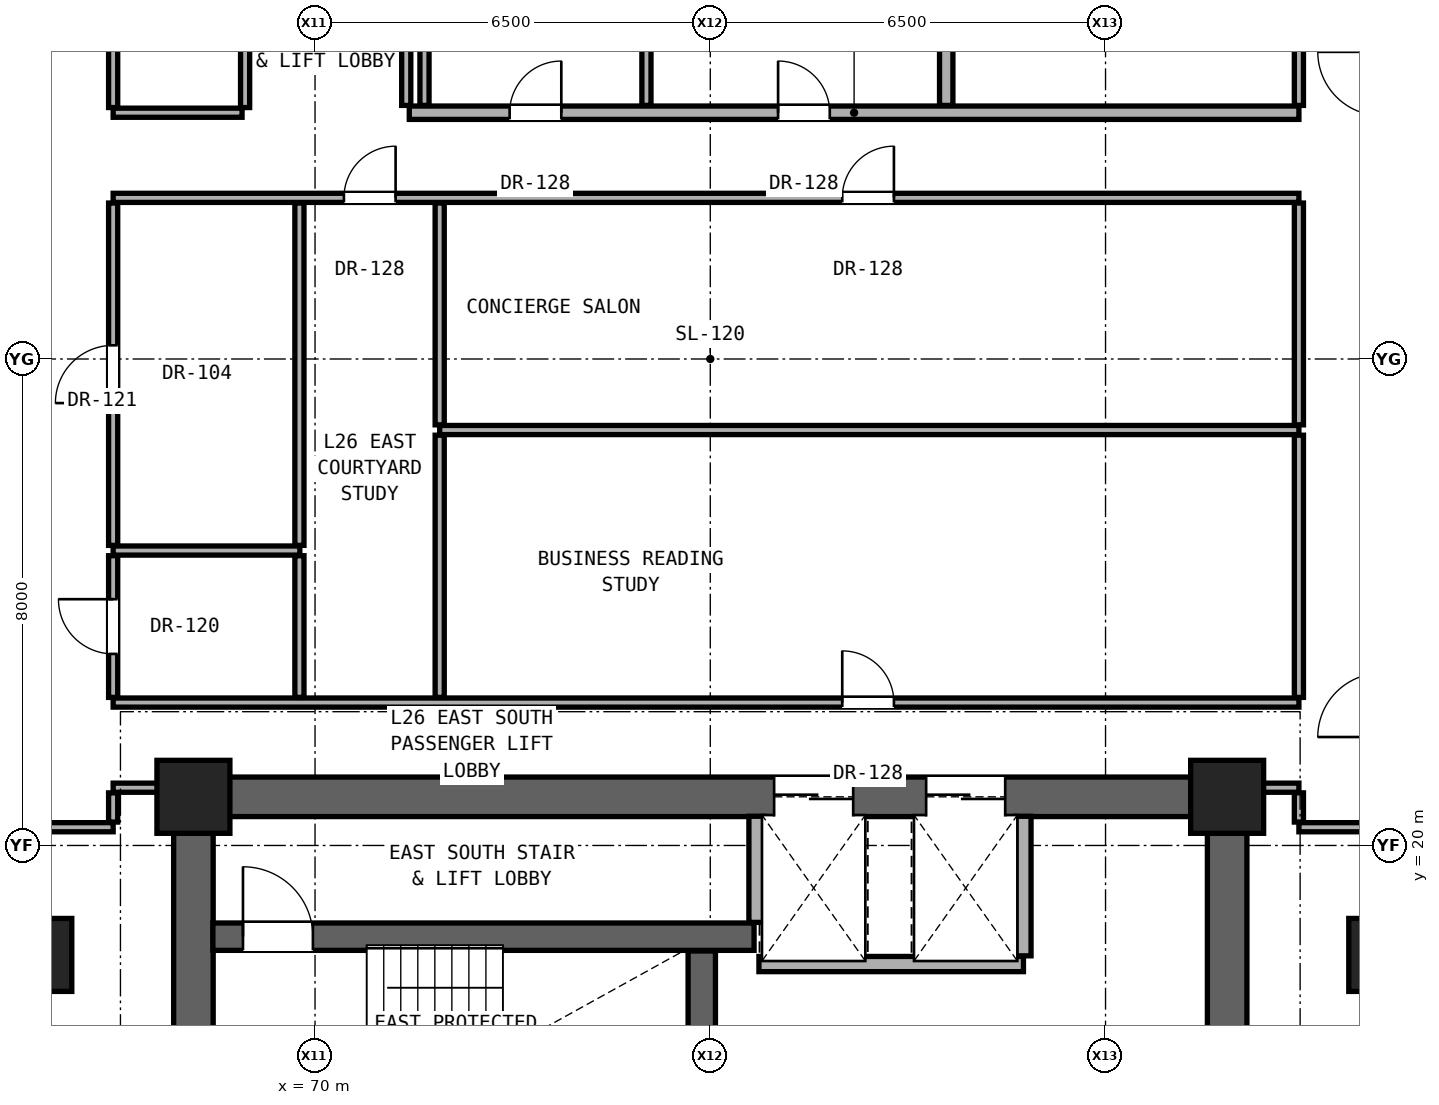
"""IFC4 building model, lengths in metres.
Left out: names, types, materials, properties, quantities, classifications, styles, units other than length and angle.
Written with IfcOpenShell. Run it as: python <this file> out.ifc"""

import sys

from ifc_helpers import new_model, si_unit, direction, frame, frame_2d, origin, origin_2d, place, context, subcontext, project, spatial, rectangle, extrude, element, fill, save


model = new_model("IFC4")
c1 = context("Model", 3, precision=1e-05, world=origin(), true_north=direction((0.0, 1.0)))
c2 = subcontext(c1, "Body", "Model", "MODEL_VIEW")
j1 = project(units=[si_unit("LENGTHUNIT", "METRE"), si_unit("PLANEANGLEUNIT", "RADIAN")], contexts=[c1])
p1 = place(None, origin())
s1 = spatial("IfcSite", under=j1, at=p1, CompositionType="ELEMENT")
p2 = place(p1, origin())
s2 = spatial("IfcBuilding", under=s1, at=p2, CompositionType="ELEMENT")
p3 = place(p2, frame((0.0, 0.0, 95.0)))
s3 = spatial("IfcBuildingStorey", under=s2, at=p3, CompositionType="ELEMENT", Elevation=95.0)
for number, where, z_axis, x_axis in (
    (1, (68.0, 20.8, 0.0), (0.0, 0.0, 1.0), (1.0, 0.0, 0.0)),
    (2, (85.0, 20.8, 0.0), (0.0, 0.0, 1.0), (1.0, 0.0, 0.0)),
):
    element("IfcColumn", number, at=place(p3, frame(where, z_axis=z_axis, x_axis=x_axis)), inside=s3, PredefinedType="COLUMN", context=c2, shape_type="SweptSolid", body=[
        extrude(rectangle(XDim=1.2, YDim=1.2, at=origin_2d()), origin(), (0.0, 0.0, 1.0), 3.3),
    ])
for number, where, z_axis, x_axis in (
    (3, (65.6, 18.2, 0.0), (0.0, 0.0, 1.0), (1.0, 0.0, 0.0)),
    (4, (87.4, 18.2, 0.0), (0.0, 0.0, 1.0), (1.0, 0.0, 0.0)),
):
    element("IfcColumn", number, at=place(p3, frame(where, z_axis=z_axis, x_axis=x_axis)), inside=s3, PredefinedType="PILASTER", context=c2, shape_type="SweptSolid", body=[
        extrude(rectangle(XDim=0.8, YDim=1.2, at=origin_2d()), origin(), (0.0, 0.0, 1.0), 3.3),
    ])
for number, where, z_axis, x_axis in (
    (5, (68.0, 15.2, 0.0), (0.0, 0.0, 1.0), (0.0, 1.0, 0.0)),
    (6, (85.0, 15.2, 0.0), (0.0, 0.0, 1.0), (0.0, 1.0, 0.0)),
):
    element("IfcWall", number, at=place(p3, frame(where, z_axis=z_axis, x_axis=x_axis)), inside=s3, PredefinedType="SHEAR", context=c2, shape_type="SweptSolid", body=[
        extrude(rectangle(XDim=5.6, YDim=0.65, at=frame_2d((2.8, 0.0))), origin(), (0.0, 0.0, 1.0), 3.08),
    ])
p4 = place(p3, frame((68.0, 20.8, 0.0), z_axis=(0.0, 0.0, 1.0), x_axis=(1.0, 0.0, 0.0)))
e7 = element("IfcWall", 7, at=p4, inside=s3, PredefinedType="SHEAR", context=c2, shape_type="SweptSolid", body=[
    extrude(rectangle(XDim=17.0, YDim=0.65, at=frame_2d((8.5, 0.0))), origin(), (0.0, 0.0, 1.0), 3.08),
])
p5 = place(p4, frame((9.55, 0.0, 0.0)))
e8 = element("IfcOpeningElement", 8, at=p5, cuts=e7, PredefinedType="OPENING", context=c2, shape_type="SweptSolid", body=[
    extrude(rectangle(XDim=1.3, YDim=2.3, at=frame_2d((0.65, 1.15))), frame((0.0, 0.335, 0.0), z_axis=(0.0, -1.0, 0.0), x_axis=(1.0, 0.0, 0.0)), (0.0, 0.0, 1.0), 0.67),
])
p6 = place(p4, frame((12.05, 0.0, 0.0)))
e9 = element("IfcOpeningElement", 9, at=p6, cuts=e7, PredefinedType="OPENING", context=c2, shape_type="SweptSolid", body=[
    extrude(rectangle(XDim=1.3, YDim=2.3, at=frame_2d((0.65, 1.15))), frame((0.0, 0.335, 0.0), z_axis=(0.0, -1.0, 0.0), x_axis=(1.0, 0.0, 0.0)), (0.0, 0.0, 1.0), 0.67),
])
p7 = place(p3, frame((77.3, 18.05, 0.0), z_axis=(0.0, 0.0, 1.0), x_axis=(1.0, 0.0, 0.0)))
e10 = element("IfcWall", 10, at=p7, inside=s3, PredefinedType="SOLIDWALL", context=c2, shape_type="SweptSolid", body=[
    extrude(rectangle(XDim=4.35, YDim=0.25, at=frame_2d((2.175, 0.0))), origin(), (0.0, 0.0, 1.0), 3.08),
])
p8 = place(p3, frame((68.32, 18.5, 0.0), z_axis=(0.0, 0.0, 1.0), x_axis=(1.0, 0.0, 0.0)))
e11 = element("IfcWall", 11, at=p8, inside=s3, PredefinedType="SHEAR", context=c2, shape_type="SweptSolid", body=[
    extrude(rectangle(XDim=8.9, YDim=0.45, at=frame_2d((4.45, 0.0))), origin(), (0.0, 0.0, 1.0), 3.08),
])
p9 = place(p8, frame((0.495, 0.0, 0.0)))
e12 = element("IfcOpeningElement", 12, at=p9, cuts=e11, PredefinedType="OPENING", context=c2, shape_type="SweptSolid", body=[
    extrude(rectangle(XDim=1.15, YDim=2.2, at=frame_2d((0.575, 1.1))), frame((0.0, 0.235, 0.0), z_axis=(0.0, -1.0, 0.0), x_axis=(1.0, 0.0, 0.0)), (0.0, 0.0, 1.0), 0.47),
])
p10 = place(p3, frame((65.32, 20.3, 0.0), z_axis=(0.0, 0.0, 1.0), x_axis=(1.0, 0.0, 0.0)))
e13 = element("IfcWall", 13, at=p10, inside=s3, PredefinedType="PARTITIONING", context=c2, shape_type="SweptSolid", body=[
    extrude(rectangle(XDim=1.36, YDim=0.15, at=frame_2d((0.68, 0.0))), origin(), (0.0, 0.0, 1.0), 3.08),
])
p11 = place(p3, frame((86.18, 20.3, 0.0), z_axis=(0.0, 0.0, 1.0), x_axis=(1.0, 0.0, 0.0)))
e14 = element("IfcWall", 14, at=p11, inside=s3, PredefinedType="PARTITIONING", context=c2, shape_type="SweptSolid", body=[
    extrude(rectangle(XDim=1.36, YDim=0.15, at=frame_2d((0.68, 0.0))), origin(), (0.0, 0.0, 1.0), 3.08),
])
p12 = place(p3, frame((66.68, 20.95, 0.0), z_axis=(0.0, 0.0, 1.0), x_axis=(1.0, 0.0, 0.0)))
e15 = element("IfcWall", 15, at=p12, inside=s3, PredefinedType="PARTITIONING", context=c2, shape_type="SweptSolid", body=[
    extrude(rectangle(XDim=1.0, YDim=0.15, at=frame_2d((0.5, 0.0))), origin(), (0.0, 0.0, 1.0), 2.472),
])
p13 = place(p3, frame((85.32, 20.95, 0.0), z_axis=(0.0, 0.0, 1.0), x_axis=(1.0, 0.0, 0.0)))
e16 = element("IfcWall", 16, at=p13, inside=s3, PredefinedType="PARTITIONING", context=c2, shape_type="SweptSolid", body=[
    extrude(rectangle(XDim=0.86, YDim=0.15, at=frame_2d((0.43, 0.0))), origin(), (0.0, 0.0, 1.0), 2.472),
])
p14 = place(p3, frame((66.68, 22.35, 0.0), z_axis=(0.0, 0.0, 1.0), x_axis=(1.0, 0.0, 0.0)))
e17 = element("IfcWall", 17, at=p14, inside=s3, PredefinedType="PARTITIONING", context=c2, shape_type="SweptSolid", body=[
    extrude(rectangle(XDim=19.5, YDim=0.15, at=frame_2d((9.75, 0.0))), origin(), (0.0, 0.0, 1.0), 2.145),
])
p15 = place(p14, frame((11.99, 0.0, 0.0)))
e18 = element("IfcOpeningElement", 18, at=p15, cuts=e17, PredefinedType="OPENING", context=c2, shape_type="SweptSolid", body=[
    extrude(rectangle(XDim=0.85, YDim=2.01, at=frame_2d((0.425, 1.005))), frame((0.0, 0.085, 0.0), z_axis=(0.0, -1.0, 0.0), x_axis=(1.0, 0.0, 0.0)), (0.0, 0.0, 1.0), 0.17),
])
p16 = place(p3, frame((66.68, 24.85, 0.0), z_axis=(0.0, 0.0, 1.0), x_axis=(1.0, 0.0, 0.0)))
e19 = element("IfcWall", 19, at=p16, inside=s3, PredefinedType="PARTITIONING", context=c2, shape_type="SweptSolid", body=[
    extrude(rectangle(XDim=3.07, YDim=0.15, at=frame_2d((1.535, 0.0))), origin(), (0.0, 0.0, 1.0), 2.145),
])
p17 = place(p3, frame((72.05, 26.832, 0.0), z_axis=(0.0, 0.0, 1.0), x_axis=(1.0, 0.0, 0.0)))
e20 = element("IfcWall", 20, at=p17, inside=s3, PredefinedType="PARTITIONING", context=c2, shape_type="SweptSolid", body=[
    extrude(rectangle(XDim=14.13, YDim=0.15, at=frame_2d((7.065, 0.0))), origin(), (0.0, 0.0, 1.0), 2.145),
])
p18 = place(p3, frame((66.68, 30.65, 0.0), z_axis=(0.0, 0.0, 1.0), x_axis=(1.0, 0.0, 0.0)))
e21 = element("IfcWall", 21, at=p18, inside=s3, PredefinedType="PARTITIONING", context=c2, shape_type="SweptSolid", body=[
    extrude(rectangle(XDim=19.5, YDim=0.15, at=frame_2d((9.75, 0.0))), origin(), (0.0, 0.0, 1.0), 2.145),
])
p19 = place(p18, frame((3.795, 0.0, 0.0)))
e22 = element("IfcOpeningElement", 22, at=p19, cuts=e21, PredefinedType="OPENING", context=c2, shape_type="SweptSolid", body=[
    extrude(rectangle(XDim=0.85, YDim=2.01, at=frame_2d((0.425, 1.005))), frame((0.0, 0.085, 0.0), z_axis=(0.0, -1.0, 0.0), x_axis=(1.0, 0.0, 0.0)), (0.0, 0.0, 1.0), 0.17),
])
p20 = place(p18, frame((11.99, 0.0, 0.0)))
e23 = element("IfcOpeningElement", 23, at=p20, cuts=e21, PredefinedType="OPENING", context=c2, shape_type="SweptSolid", body=[
    extrude(rectangle(XDim=0.85, YDim=2.01, at=frame_2d((0.425, 1.005))), frame((0.0, 0.085, 0.0), z_axis=(0.0, -1.0, 0.0), x_axis=(1.0, 0.0, 0.0)), (0.0, 0.0, 1.0), 0.17),
])
p21 = place(p3, frame((66.68, 32.05, 0.0), z_axis=(0.0, 0.0, 1.0), x_axis=(1.0, 0.0, 0.0)))
e24 = element("IfcWall", 24, at=p21, inside=s3, PredefinedType="PARTITIONING", context=c2, shape_type="SweptSolid", body=[
    extrude(rectangle(XDim=2.12, YDim=0.15, at=frame_2d((1.06, 0.0))), origin(), (0.0, 0.0, 1.0), 2.145),
])
p22 = place(p3, frame((71.55, 32.05, 0.0), z_axis=(0.0, 0.0, 1.0), x_axis=(1.0, 0.0, 0.0)))
e25 = element("IfcWall", 25, at=p22, inside=s3, PredefinedType="SOLIDWALL", context=c2, shape_type="SweptSolid", body=[
    extrude(rectangle(XDim=14.63, YDim=0.22, at=frame_2d((7.315, 0.0))), origin(), (0.0, 0.0, 1.0), 2.145),
])
p23 = place(p22, frame((6.065, 0.0, 0.0)))
e26 = element("IfcOpeningElement", 26, at=p23, cuts=e25, PredefinedType="OPENING", context=c2, shape_type="SweptSolid", body=[
    extrude(rectangle(XDim=0.85, YDim=2.01, at=frame_2d((0.425, 1.005))), frame((0.0, 0.12, 0.0), z_axis=(0.0, -1.0, 0.0), x_axis=(1.0, 0.0, 0.0)), (0.0, 0.0, 1.0), 0.24),
])
p24 = place(p22, frame((1.65, 0.0, 0.0)))
e27 = element("IfcOpeningElement", 27, at=p24, cuts=e25, PredefinedType="OPENING", context=c2, shape_type="SweptSolid", body=[
    extrude(rectangle(XDim=0.85, YDim=2.01, at=frame_2d((0.425, 1.005))), frame((0.0, 0.12, 0.0), z_axis=(0.0, -1.0, 0.0), x_axis=(1.0, 0.0, 0.0)), (0.0, 0.0, 1.0), 0.24),
])
p25 = place(p3, frame((66.68, 20.385, 0.0), z_axis=(0.0, 0.0, 1.0), x_axis=(0.0, 1.0, 0.0)))
e28 = element("IfcWall", 28, at=p25, inside=s3, PredefinedType="PARTITIONING", context=c2, shape_type="SweptSolid", body=[
    extrude(rectangle(XDim=0.48, YDim=0.15, at=frame_2d((0.24, 0.0))), origin(), (0.0, 0.0, 1.0), 2.472),
])
p26 = place(p3, frame((66.68, 22.435, 0.0), z_axis=(0.0, 0.0, 1.0), x_axis=(0.0, 1.0, 0.0)))
e29 = element("IfcWall", 29, at=p26, inside=s3, PredefinedType="PARTITIONING", context=c2, shape_type="SweptSolid", body=[
    extrude(rectangle(XDim=2.33, YDim=0.15, at=frame_2d((1.165, 0.0))), origin(), (0.0, 0.0, 1.0), 3.08),
])
p27 = place(p26, frame((0.715, 0.0, 0.0)))
e30 = element("IfcOpeningElement", 30, at=p27, cuts=e29, PredefinedType="OPENING", context=c2, shape_type="SweptSolid", body=[
    extrude(rectangle(XDim=0.9, YDim=2.1, at=frame_2d((0.45, 1.05))), frame((0.0, 0.085, 0.0), z_axis=(0.0, -1.0, 0.0), x_axis=(1.0, 0.0, 0.0)), (0.0, 0.0, 1.0), 0.17),
])
p28 = place(p3, frame((66.68, 24.935, 0.0), z_axis=(0.0, 0.0, 1.0), x_axis=(0.0, 1.0, 0.0)))
e31 = element("IfcWall", 31, at=p28, inside=s3, PredefinedType="PARTITIONING", context=c2, shape_type="SweptSolid", body=[
    extrude(rectangle(XDim=5.63, YDim=0.15, at=frame_2d((2.815, 0.0))), origin(), (0.0, 0.0, 1.0), 2.299),
])
p29 = place(p28, frame((2.34, 0.0, 0.0)))
e32 = element("IfcOpeningElement", 32, at=p29, cuts=e31, PredefinedType="OPENING", context=c2, shape_type="SweptSolid", body=[
    extrude(rectangle(XDim=0.95, YDim=2.15, at=frame_2d((0.475, 1.075))), frame((0.0, 0.085, 0.0), z_axis=(0.0, -1.0, 0.0), x_axis=(1.0, 0.0, 0.0)), (0.0, 0.0, 1.0), 0.17),
])
p30 = place(p3, frame((66.68, 32.135, 0.0), z_axis=(0.0, 0.0, 1.0), x_axis=(0.0, 1.0, 0.0)))
e33 = element("IfcWall", 33, at=p30, inside=s3, PredefinedType="PARTITIONING", context=c2, shape_type="SweptSolid", body=[
    extrude(rectangle(XDim=3.48, YDim=0.15, at=frame_2d((1.74, 0.0))), origin(), (0.0, 0.0, 1.0), 2.472),
])
p31 = place(p3, frame((68.85, 32.135, 0.0), z_axis=(0.0, 0.0, 1.0), x_axis=(0.0, 1.0, 0.0)))
e34 = element("IfcWall", 34, at=p31, inside=s3, PredefinedType="PARTITIONING", context=c2, shape_type="SweptSolid", body=[
    extrude(rectangle(XDim=2.745, YDim=0.15, at=frame_2d((1.373, 0.0))), origin(), (0.0, 0.0, 1.0), 3.08),
])
p32 = place(p3, frame((69.743, 22.435, 0.0), z_axis=(0.0, 0.0, 1.0), x_axis=(0.0, 1.0, 0.0)))
e35 = element("IfcWall", 35, at=p32, inside=s3, PredefinedType="PARTITIONING", context=c2, shape_type="SweptSolid", body=[
    extrude(rectangle(XDim=2.33, YDim=0.15, at=frame_2d((1.165, 0.0))), origin(), (0.0, 0.0, 1.0), 3.08),
])
p33 = place(p3, frame((69.743, 24.935, 0.0), z_axis=(0.0, 0.0, 1.0), x_axis=(0.0, 1.0, 0.0)))
e36 = element("IfcWall", 36, at=p33, inside=s3, PredefinedType="PARTITIONING", context=c2, shape_type="SweptSolid", body=[
    extrude(rectangle(XDim=5.63, YDim=0.15, at=frame_2d((2.815, 0.0))), origin(), (0.0, 0.0, 1.0), 2.145),
])
for number, where, z_axis, x_axis in (
    (37, (71.5, 32.17, 0.0), (0.0, 0.0, 1.0), (0.0, 1.0, 0.0)),
    (38, (71.8, 32.17, 0.0), (0.0, 0.0, 1.0), (0.0, 1.0, 0.0)),
):
    element("IfcWall", number, at=place(p3, frame(where, z_axis=z_axis, x_axis=x_axis)), inside=s3, PredefinedType="PARTITIONING", context=c2, shape_type="SweptSolid", body=[
        extrude(rectangle(XDim=2.71, YDim=0.15, at=frame_2d((1.355, 0.0))), origin(), (0.0, 0.0, 1.0), 3.08),
    ])
p34 = place(p3, frame((72.05, 22.435, 0.0), z_axis=(0.0, 0.0, 1.0), x_axis=(0.0, 1.0, 0.0)))
e39 = element("IfcWall", 39, at=p34, inside=s3, PredefinedType="PARTITIONING", context=c2, shape_type="SweptSolid", body=[
    extrude(rectangle(XDim=4.312, YDim=0.15, at=frame_2d((2.156, 0.0))), origin(), (0.0, 0.0, 1.0), 2.609),
])
p35 = place(p3, frame((72.05, 26.917, 0.0), z_axis=(0.0, 0.0, 1.0), x_axis=(0.0, 1.0, 0.0)))
e40 = element("IfcWall", 40, at=p35, inside=s3, PredefinedType="PARTITIONING", context=c2, shape_type="SweptSolid", body=[
    extrude(rectangle(XDim=3.648, YDim=0.15, at=frame_2d((1.824, 0.0))), origin(), (0.0, 0.0, 1.0), 2.145),
])
p36 = place(p3, frame((75.45, 32.17, 0.0), z_axis=(0.0, 0.0, 1.0), x_axis=(0.0, 1.0, 0.0)))
e41 = element("IfcWall", 41, at=p36, inside=s3, PredefinedType="PARTITIONING", context=c2, shape_type="SweptSolid", body=[
    extrude(rectangle(XDim=2.71, YDim=0.15, at=frame_2d((1.355, 0.0))), origin(), (0.0, 0.0, 1.0), 3.08),
])
p37 = place(p3, frame((76.36, 15.815, 0.0), z_axis=(0.0, 0.0, 1.0), x_axis=(0.0, 1.0, 0.0)))
e42 = element("IfcWall", 42, at=p37, inside=s3, PredefinedType="SHEAR", context=c2, shape_type="SweptSolid", body=[
    extrude(rectangle(XDim=2.45, YDim=0.45, at=frame_2d((1.225, 0.0))), origin(), (0.0, 0.0, 1.0), 3.08),
])
p38 = place(p3, frame((77.26, 18.735, 0.0), z_axis=(0.0, 0.0, 1.0), x_axis=(0.0, 1.0, 0.0)))
e43 = element("IfcWall", 43, at=p38, inside=s3, PredefinedType="SOLIDWALL", context=c2, shape_type="SweptSolid", body=[
    extrude(rectangle(XDim=1.745, YDim=0.25, at=frame_2d((0.873, 0.0))), origin(), (0.0, 0.0, 1.0), 3.08),
])
p39 = place(p3, frame((80.38, 32.17, 0.0), z_axis=(0.0, 0.0, 1.0), x_axis=(0.0, 1.0, 0.0)))
e44 = element("IfcWall", 44, at=p39, inside=s3, PredefinedType="SOLIDWALL", context=c2, shape_type="SweptSolid", body=[
    extrude(rectangle(XDim=2.71, YDim=0.22, at=frame_2d((1.355, 0.0))), origin(), (0.0, 0.0, 1.0), 3.08),
])
p40 = place(p3, frame((81.65, 18.185, 0.0), z_axis=(0.0, 0.0, 1.0), x_axis=(0.0, 1.0, 0.0)))
e45 = element("IfcWall", 45, at=p40, inside=s3, PredefinedType="SOLIDWALL", context=c2, shape_type="SweptSolid", body=[
    extrude(rectangle(XDim=2.295, YDim=0.25, at=frame_2d((1.147, 0.0))), origin(), (0.0, 0.0, 1.0), 3.08),
])
p41 = place(p3, frame((86.18, 20.385, 0.0), z_axis=(0.0, 0.0, 1.0), x_axis=(0.0, 1.0, 0.0)))
e46 = element("IfcWall", 46, at=p41, inside=s3, PredefinedType="PARTITIONING", context=c2, shape_type="SweptSolid", body=[
    extrude(rectangle(XDim=0.48, YDim=0.15, at=frame_2d((0.24, 0.0))), origin(), (0.0, 0.0, 1.0), 2.472),
])
p42 = place(p3, frame((86.18, 22.435, 0.0), z_axis=(0.0, 0.0, 1.0), x_axis=(0.0, 1.0, 0.0)))
e47 = element("IfcWall", 47, at=p42, inside=s3, PredefinedType="PARTITIONING", context=c2, shape_type="SweptSolid", body=[
    extrude(rectangle(XDim=4.312, YDim=0.15, at=frame_2d((2.156, 0.0))), origin(), (0.0, 0.0, 1.0), 3.08),
])
p43 = place(p3, frame((86.18, 26.917, 0.0), z_axis=(0.0, 0.0, 1.0), x_axis=(0.0, 1.0, 0.0)))
e48 = element("IfcWall", 48, at=p43, inside=s3, PredefinedType="PARTITIONING", context=c2, shape_type="SweptSolid", body=[
    extrude(rectangle(XDim=3.648, YDim=0.15, at=frame_2d((1.824, 0.0))), origin(), (0.0, 0.0, 1.0), 2.299),
])
p44 = place(p3, frame((86.18, 32.17, 0.0), z_axis=(0.0, 0.0, 1.0), x_axis=(0.0, 1.0, 0.0)))
e49 = element("IfcWall", 49, at=p44, inside=s3, PredefinedType="PARTITIONING", context=c2, shape_type="SweptSolid", body=[
    extrude(rectangle(XDim=3.445, YDim=0.15, at=frame_2d((1.723, 0.0))), origin(), (0.0, 0.0, 1.0), 2.472),
])
p45 = place(p23, origin())
e50 = element("IfcDoor", 50, at=p45, inside=s3, OperationType="SINGLE_SWING_LEFT", PredefinedType="DOOR", context=c2, shape_type="SweptSolid", body=[
    extrude(rectangle(XDim=0.85, YDim=2.01, at=frame_2d((0.425, 1.005))), frame((0.0, 0.025, 0.0), z_axis=(0.0, -1.0, 0.0), x_axis=(1.0, 0.0, 0.0)), (0.0, 0.0, 1.0), 0.05),
])
fill(e26, e50)
p46 = place(p24, origin())
e51 = element("IfcDoor", 51, at=p46, inside=s3, OperationType="SINGLE_SWING_RIGHT", PredefinedType="DOOR", context=c2, shape_type="SweptSolid", body=[
    extrude(rectangle(XDim=0.85, YDim=2.01, at=frame_2d((0.425, 1.005))), frame((0.0, 0.025, 0.0), z_axis=(0.0, -1.0, 0.0), x_axis=(1.0, 0.0, 0.0)), (0.0, 0.0, 1.0), 0.05),
])
fill(e27, e51)
p47 = place(p9, origin())
e52 = element("IfcDoor", 52, at=p47, inside=s3, OperationType="SINGLE_SWING_LEFT", PredefinedType="DOOR", context=c2, shape_type="SweptSolid", body=[
    extrude(rectangle(XDim=1.15, YDim=2.2, at=frame_2d((0.575, 1.1))), frame((0.0, 0.025, 0.0), z_axis=(0.0, -1.0, 0.0), x_axis=(1.0, 0.0, 0.0)), (0.0, 0.0, 1.0), 0.05),
])
fill(e12, e52)
p48 = place(p27, origin())
e53 = element("IfcDoor", 53, at=p48, inside=s3, OperationType="SINGLE_SWING_RIGHT", PredefinedType="DOOR", context=c2, shape_type="SweptSolid", body=[
    extrude(rectangle(XDim=0.9, YDim=2.1, at=frame_2d((0.45, 1.05))), frame((0.0, 0.025, 0.0), z_axis=(0.0, -1.0, 0.0), x_axis=(1.0, 0.0, 0.0)), (0.0, 0.0, 1.0), 0.05),
])
fill(e30, e53)
p49 = place(p29, origin())
e54 = element("IfcDoor", 54, at=p49, inside=s3, OperationType="SINGLE_SWING_LEFT", PredefinedType="DOOR", context=c2, shape_type="SweptSolid", body=[
    extrude(rectangle(XDim=0.95, YDim=2.15, at=frame_2d((0.475, 1.075))), frame((0.0, 0.025, 0.0), z_axis=(0.0, -1.0, 0.0), x_axis=(1.0, 0.0, 0.0)), (0.0, 0.0, 1.0), 0.05),
])
fill(e32, e54)
p50 = place(p19, origin())
e55 = element("IfcDoor", 55, at=p50, inside=s3, OperationType="SINGLE_SWING_RIGHT", PredefinedType="DOOR", context=c2, shape_type="SweptSolid", body=[
    extrude(rectangle(XDim=0.85, YDim=2.01, at=frame_2d((0.425, 1.005))), frame((0.0, 0.025, 0.0), z_axis=(0.0, -1.0, 0.0), x_axis=(1.0, 0.0, 0.0)), (0.0, 0.0, 1.0), 0.05),
])
fill(e22, e55)
p51 = place(p15, origin())
e56 = element("IfcDoor", 56, at=p51, inside=s3, OperationType="SINGLE_SWING_LEFT", PredefinedType="DOOR", context=c2, shape_type="SweptSolid", body=[
    extrude(rectangle(XDim=0.85, YDim=2.01, at=frame_2d((0.425, 1.005))), frame((0.0, 0.025, 0.0), z_axis=(0.0, -1.0, 0.0), x_axis=(1.0, 0.0, 0.0)), (0.0, 0.0, 1.0), 0.05),
])
fill(e18, e56)
p52 = place(p20, origin())
e57 = element("IfcDoor", 57, at=p52, inside=s3, OperationType="SINGLE_SWING_RIGHT", PredefinedType="DOOR", context=c2, shape_type="SweptSolid", body=[
    extrude(rectangle(XDim=0.85, YDim=2.01, at=frame_2d((0.425, 1.005))), frame((0.0, 0.025, 0.0), z_axis=(0.0, -1.0, 0.0), x_axis=(1.0, 0.0, 0.0)), (0.0, 0.0, 1.0), 0.05),
])
fill(e23, e57)
p53 = place(p5, origin())
e58 = element("IfcDoor", 58, at=p53, inside=s3, OperationType="DOUBLE_DOOR_SLIDING", PredefinedType="DOOR", context=c2, shape_type="SweptSolid", body=[
    extrude(rectangle(XDim=1.3, YDim=2.3, at=frame_2d((0.65, 1.15))), frame((0.0, 0.025, 0.0), z_axis=(0.0, -1.0, 0.0), x_axis=(1.0, 0.0, 0.0)), (0.0, 0.0, 1.0), 0.05),
])
fill(e8, e58)
p54 = place(p6, origin())
e59 = element("IfcDoor", 59, at=p54, inside=s3, OperationType="DOUBLE_DOOR_SLIDING", PredefinedType="DOOR", context=c2, shape_type="SweptSolid", body=[
    extrude(rectangle(XDim=1.3, YDim=2.3, at=frame_2d((0.65, 1.15))), frame((0.0, 0.025, 0.0), z_axis=(0.0, -1.0, 0.0), x_axis=(1.0, 0.0, 0.0)), (0.0, 0.0, 1.0), 0.05),
])
fill(e9, e59)
save(model, sys.argv[1])
